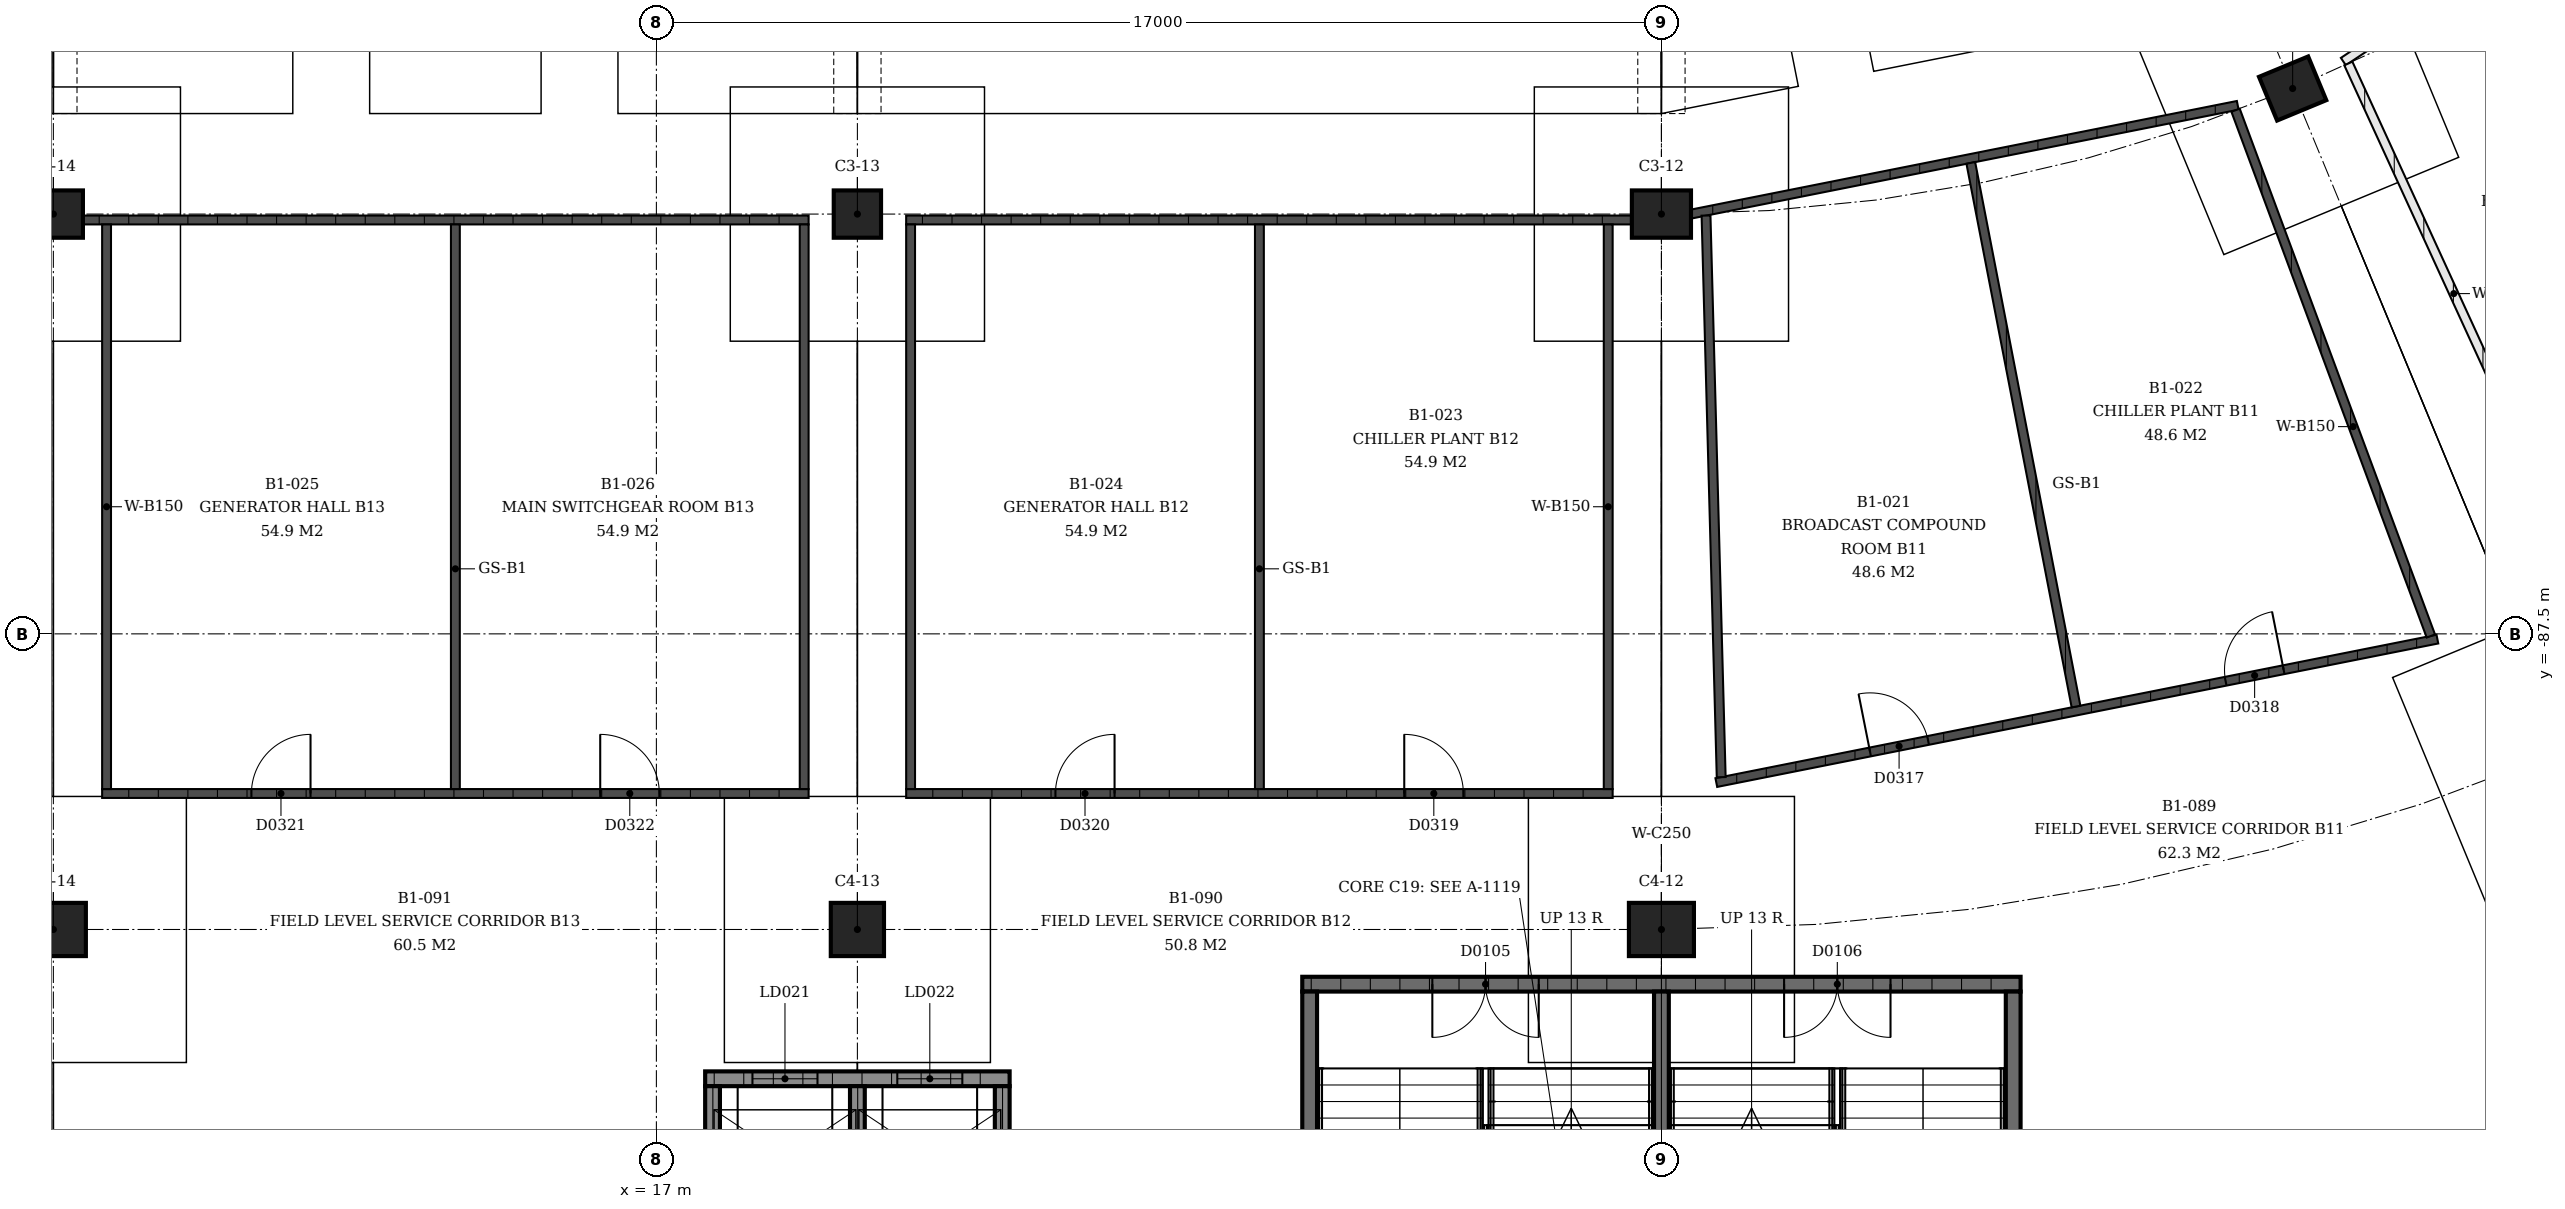
"""IFC4 building model, lengths in metres.
Left out: names, types, materials, properties, quantities, classifications, styles, units other than length and angle.
Written with IfcOpenShell. Run it as: python <this file> out.ifc"""

import sys

from ifc_helpers import new_model, si_unit, direction, frame, frame_2d, origin, origin_2d, place, context, subcontext, project, spatial, rectangle, extrude, element, fill, save


model = new_model("IFC4")
c1 = context("Model", 3, precision=1e-05, world=origin(), true_north=direction((0.0, 1.0)))
c2 = subcontext(c1, "Body", "Model", "MODEL_VIEW")
j1 = project(units=[si_unit("LENGTHUNIT", "METRE"), si_unit("PLANEANGLEUNIT", "RADIAN")], contexts=[c1])
p1 = place(None, origin())
s1 = spatial("IfcSite", under=j1, at=p1, CompositionType="ELEMENT")
p2 = place(p1, origin())
s2 = spatial("IfcBuilding", under=s1, at=p2, CompositionType="ELEMENT")
p3 = place(p2, frame((0.0, 0.0, -4.5)))
s3 = spatial("IfcBuildingStorey", under=s2, at=p3, CompositionType="ELEMENT", Elevation=-4.5)
p4 = place(p3, frame((44.677, -78.276, 0.0), z_axis=(0.0, 0.0, 1.0), x_axis=(0.923879532511, 0.382683432365, 0.0)))
e1 = element("IfcColumn", 1, at=p4, inside=s3, PredefinedType="COLUMN", context=c2, shape_type="SweptSolid", body=[
    extrude(rectangle(XDim=0.9, YDim=0.8, at=origin_2d()), origin(), (0.0, 0.0, 1.0), 4.5),
])
p5 = place(p3, frame((34.0, -80.4, 0.0), z_axis=(0.0, 0.0, 1.0), x_axis=(1.0, 0.0, 0.0)))
e2 = element("IfcColumn", 2, at=p5, inside=s3, PredefinedType="COLUMN", context=c2, shape_type="SweptSolid", body=[
    extrude(rectangle(XDim=1.0, YDim=0.8, at=origin_2d()), origin(), (0.0, 0.0, 1.0), 4.5),
])
p6 = place(p3, frame((34.0, -92.5, 0.0), z_axis=(0.0, 0.0, 1.0), x_axis=(1.0, 0.0, 0.0)))
e3 = element("IfcColumn", 3, at=p6, inside=s3, PredefinedType="COLUMN", context=c2, shape_type="SweptSolid", body=[
    extrude(rectangle(XDim=1.1, YDim=0.9, at=origin_2d()), origin(), (0.0, 0.0, 1.0), 4.5),
])
p7 = place(p3, frame((20.4, -80.4, 0.0), z_axis=(0.0, 0.0, 1.0), x_axis=(1.0, 0.0, 0.0)))
e4 = element("IfcColumn", 4, at=p7, inside=s3, PredefinedType="COLUMN", context=c2, shape_type="SweptSolid", body=[
    extrude(rectangle(XDim=0.8, YDim=0.8, at=origin_2d()), origin(), (0.0, 0.0, 1.0), 4.5),
])
p8 = place(p3, frame((20.4, -92.5, 0.0), z_axis=(0.0, 0.0, 1.0), x_axis=(1.0, 0.0, 0.0)))
e5 = element("IfcColumn", 5, at=p8, inside=s3, PredefinedType="COLUMN", context=c2, shape_type="SweptSolid", body=[
    extrude(rectangle(XDim=0.9, YDim=0.9, at=origin_2d()), origin(), (0.0, 0.0, 1.0), 4.5),
])
p9 = place(p3, frame((6.8, -80.4, 0.0), z_axis=(0.0, 0.0, 1.0), x_axis=(1.0, 0.0, 0.0)))
e6 = element("IfcColumn", 6, at=p9, inside=s3, PredefinedType="COLUMN", context=c2, shape_type="SweptSolid", body=[
    extrude(rectangle(XDim=1.0, YDim=0.8, at=origin_2d()), origin(), (0.0, 0.0, 1.0), 4.5),
])
p10 = place(p3, frame((6.8, -92.5, 0.0), z_axis=(0.0, 0.0, 1.0), x_axis=(1.0, 0.0, 0.0)))
e7 = element("IfcColumn", 7, at=p10, inside=s3, PredefinedType="COLUMN", context=c2, shape_type="SweptSolid", body=[
    extrude(rectangle(XDim=1.1, YDim=0.9, at=origin_2d()), origin(), (0.0, 0.0, 1.0), 4.5),
])
p11 = place(p3, frame((27.925, -93.425, 0.0), z_axis=(0.0, 0.0, 1.0), x_axis=(1.0, 0.0, 0.0)))
e8 = element("IfcWall", 8, at=p11, inside=s3, PredefinedType="SHEAR", context=c2, shape_type="SweptSolid", body=[
    extrude(rectangle(XDim=12.15, YDim=0.25, at=frame_2d((6.075, 0.0))), origin(), (0.0, 0.0, 1.0), 4.09),
])
p12 = place(p11, frame((2.2, 0.0, 0.0)))
e9 = element("IfcOpeningElement", 9, at=p12, cuts=e8, PredefinedType="OPENING", context=c2, shape_type="SweptSolid", body=[
    extrude(rectangle(XDim=1.8, YDim=2.1, at=frame_2d((0.9, 1.05))), frame((0.0, 0.125, 0.0), z_axis=(0.0, -1.0, 0.0), x_axis=(1.0, 0.0, 0.0)), (0.0, 0.0, 1.0), 0.25),
])
p13 = place(p11, frame((8.15, 0.0, 0.0)))
e10 = element("IfcOpeningElement", 10, at=p13, cuts=e8, PredefinedType="OPENING", context=c2, shape_type="SweptSolid", body=[
    extrude(rectangle(XDim=1.8, YDim=2.1, at=frame_2d((0.9, 1.05))), frame((0.0, 0.125, 0.0), z_axis=(0.0, -1.0, 0.0), x_axis=(1.0, 0.0, 0.0)), (0.0, 0.0, 1.0), 0.25),
])
p14 = place(p3, frame((28.05, -93.55, 0.0), z_axis=(0.0, 0.0, 1.0), x_axis=(0.0, -1.0, 0.0)))
e11 = element("IfcWall", 11, at=p14, inside=s3, PredefinedType="SHEAR", context=c2, shape_type="SweptSolid", body=[
    extrude(rectangle(XDim=7.46, YDim=0.25, at=frame_2d((3.73, 0.0))), origin(), (0.0, 0.0, 1.0), 4.09),
])
p15 = place(p3, frame((39.95, -93.55, 0.0), z_axis=(0.0, 0.0, 1.0), x_axis=(0.0, -1.0, 0.0)))
e12 = element("IfcWall", 12, at=p15, inside=s3, PredefinedType="SHEAR", context=c2, shape_type="SweptSolid", body=[
    extrude(rectangle(XDim=7.71, YDim=0.25, at=frame_2d((3.855, 0.0))), origin(), (0.0, 0.0, 1.0), 4.09),
])
p16 = place(p3, frame((34.0, -93.55, 0.0), z_axis=(0.0, 0.0, 1.0), x_axis=(0.0, -1.0, 0.0)))
e13 = element("IfcWall", 13, at=p16, inside=s3, PredefinedType="SHEAR", context=c2, shape_type="SweptSolid", body=[
    extrude(rectangle(XDim=7.46, YDim=0.25, at=frame_2d((3.73, 0.0))), origin(), (0.0, 0.0, 1.0), 4.09),
])
p17 = place(p3, frame((17.825, -95.025, -1.2), z_axis=(0.0, 0.0, 1.0), x_axis=(1.0, 0.0, 0.0)))
e14 = element("IfcWall", 14, at=p17, inside=s3, PredefinedType="SHEAR", context=c2, shape_type="SweptSolid", body=[
    extrude(rectangle(XDim=5.15, YDim=0.25, at=frame_2d((2.575, 0.0))), origin(), (0.0, 0.0, 1.0), 5.29),
])
p18 = place(p17, frame((0.8, 0.0, 1.2)))
e15 = element("IfcOpeningElement", 15, at=p18, cuts=e14, PredefinedType="OPENING", context=c2, shape_type="SweptSolid", body=[
    extrude(rectangle(XDim=1.1, YDim=2.1, at=frame_2d((0.55, 1.05))), frame((0.0, 0.125, 0.0), z_axis=(0.0, -1.0, 0.0), x_axis=(1.0, 0.0, 0.0)), (0.0, 0.0, 1.0), 0.25),
])
p19 = place(p17, frame((3.25, 0.0, 1.2)))
e16 = element("IfcOpeningElement", 16, at=p19, cuts=e14, PredefinedType="OPENING", context=c2, shape_type="SweptSolid", body=[
    extrude(rectangle(XDim=1.1, YDim=2.1, at=frame_2d((0.55, 1.05))), frame((0.0, 0.125, 0.0), z_axis=(0.0, -1.0, 0.0), x_axis=(1.0, 0.0, 0.0)), (0.0, 0.0, 1.0), 0.25),
])
for number, where, z_axis, x_axis in (
    (17, (17.95, -95.15, -1.2), (0.0, 0.0, 1.0), (0.0, -1.0, 0.0)),
    (18, (22.85, -95.15, -1.2), (0.0, 0.0, 1.0), (0.0, -1.0, 0.0)),
    (19, (20.4, -95.15, -1.2), (0.0, 0.0, 1.0), (0.0, -1.0, 0.0)),
):
    element("IfcWall", number, at=place(p3, frame(where, z_axis=z_axis, x_axis=x_axis)), inside=s3, PredefinedType="SHEAR", context=c2, shape_type="SweptSolid", body=[
        extrude(rectangle(XDim=3.0, YDim=0.25, at=frame_2d((1.5, 0.0))), origin(), (0.0, 0.0, 1.0), 5.29),
    ])
p20 = place(p3, frame((53.417, -72.554, 0.0), z_axis=(0.0, 0.0, 1.0), x_axis=(-0.831475366226, -0.555561621569, 0.0)))
e20 = element("IfcWall", 20, at=p20, inside=s3, PredefinedType="PARTITIONING", context=c2, shape_type="SweptSolid", body=[
    extrude(rectangle(XDim=9.48, YDim=0.15, at=frame_2d((4.74, 0.0))), origin(), (0.0, 0.0, 1.0), 3.0),
])
p21 = place(p3, frame((45.619, -77.853, 0.0), z_axis=(0.0, 0.0, 1.0), x_axis=(0.416598882755, -0.909090408533, 0.0)))
e21 = element("IfcWall", 21, at=p21, inside=s3, PredefinedType="PARTITIONING", context=c2, shape_type="SweptSolid", body=[
    extrude(rectangle(XDim=9.487, YDim=0.15, at=frame_2d((4.743, 0.0))), origin(), (0.0, 0.0, 1.0), 3.0),
])
p22 = place(p3, frame((34.5, -80.401, 0.0), z_axis=(0.0, 0.0, 1.0), x_axis=(0.980785277375, 0.195090337241, 0.0)))
e22 = element("IfcWall", 22, at=p22, inside=s3, PredefinedType="SOLIDWALL", context=c2, shape_type="SweptSolid", body=[
    extrude(rectangle(XDim=9.429, YDim=0.15, at=frame_2d((4.715, 0.0))), origin(), (0.0, 0.0, 1.0), 3.0),
])
p23 = place(p3, frame((34.929, -90.015, 0.0), z_axis=(0.0, 0.0, 1.0), x_axis=(0.980781768414, 0.19510797715, 0.0)))
e23 = element("IfcWall", 23, at=p23, inside=s3, PredefinedType="SOLIDWALL", context=c2, shape_type="SweptSolid", body=[
    extrude(rectangle(XDim=12.436, YDim=0.15, at=frame_2d((6.218, 0.0))), origin(), (0.0, 0.0, 1.0), 3.0),
])
p24 = place(p23, frame((2.652, 0.0, 0.0)))
e24 = element("IfcOpeningElement", 24, at=p24, cuts=e23, PredefinedType="OPENING", context=c2, shape_type="SweptSolid", body=[
    extrude(rectangle(XDim=1.0, YDim=2.1, at=frame_2d((0.5, 1.05))), frame((0.0, 0.075, 0.0), z_axis=(0.0, -1.0, 0.0), x_axis=(1.0, 0.0, 0.0)), (0.0, 0.0, 1.0), 0.15),
])
p25 = place(p23, frame((8.784, 0.0, 0.0)))
e25 = element("IfcOpeningElement", 25, at=p25, cuts=e23, PredefinedType="OPENING", context=c2, shape_type="SweptSolid", body=[
    extrude(rectangle(XDim=1.0, YDim=2.1, at=frame_2d((0.5, 1.05))), frame((0.0, 0.075, 0.0), z_axis=(0.0, -1.0, 0.0), x_axis=(1.0, 0.0, 0.0)), (0.0, 0.0, 1.0), 0.15),
])
p26 = place(p3, frame((34.754, -80.425, 0.0), z_axis=(0.0, 0.0, 1.0), x_axis=(0.027003283405, -0.999635344856, 0.0)))
e26 = element("IfcWall", 26, at=p26, inside=s3, PredefinedType="SOLIDWALL", context=c2, shape_type="SweptSolid", body=[
    extrude(rectangle(XDim=9.502, YDim=0.15, at=frame_2d((4.751, 0.0))), origin(), (0.0, 0.0, 1.0), 3.0),
])
p27 = place(p3, frame((39.233, -79.534, 0.0), z_axis=(0.0, 0.0, 1.0), x_axis=(0.190042167924, -0.98177592882, 0.0)))
e27 = element("IfcWall", 27, at=p27, inside=s3, PredefinedType="SOLIDWALL", context=c2, shape_type="SweptSolid", body=[
    extrude(rectangle(XDim=9.366, YDim=0.15, at=frame_2d((4.683, 0.0))), origin(), (0.0, 0.0, 1.0), 3.0),
])
p28 = place(p3, frame((43.711, -78.643, 0.0), z_axis=(0.0, 0.0, 1.0), x_axis=(0.348225298515, -0.937410871216, 0.0)))
e28 = element("IfcWall", 28, at=p28, inside=s3, PredefinedType="SOLIDWALL", context=c2, shape_type="SweptSolid", body=[
    extrude(rectangle(XDim=9.487, YDim=0.15, at=frame_2d((4.743, 0.0))), origin(), (0.0, 0.0, 1.0), 3.0),
])
p29 = place(p3, frame((33.5, -80.5, 0.0), z_axis=(0.0, 0.0, 1.0), x_axis=(-1.0, 0.0, 0.0)))
e29 = element("IfcWall", 29, at=p29, inside=s3, PredefinedType="SOLIDWALL", context=c2, shape_type="SweptSolid", body=[
    extrude(rectangle(XDim=12.275, YDim=0.15, at=frame_2d((6.137, 0.0))), origin(), (0.0, 0.0, 1.0), 3.0),
])
p30 = place(p3, frame((33.175, -90.2, 0.0), z_axis=(0.0, 0.0, 1.0), x_axis=(-1.0, 0.0, 0.0)))
e30 = element("IfcWall", 30, at=p30, inside=s3, PredefinedType="SOLIDWALL", context=c2, shape_type="SweptSolid", body=[
    extrude(rectangle(XDim=11.95, YDim=0.15, at=frame_2d((5.975, 0.0))), origin(), (0.0, 0.0, 1.0), 3.0),
])
p31 = place(p30, frame((2.525, 0.0, 0.0)))
e31 = element("IfcOpeningElement", 31, at=p31, cuts=e30, PredefinedType="OPENING", context=c2, shape_type="SweptSolid", body=[
    extrude(rectangle(XDim=1.0, YDim=2.1, at=frame_2d((0.5, 1.05))), frame((0.0, 0.075, 0.0), z_axis=(0.0, -1.0, 0.0), x_axis=(1.0, 0.0, 0.0)), (0.0, 0.0, 1.0), 0.15),
])
p32 = place(p30, frame((8.425, 0.0, 0.0)))
e32 = element("IfcOpeningElement", 32, at=p32, cuts=e30, PredefinedType="OPENING", context=c2, shape_type="SweptSolid", body=[
    extrude(rectangle(XDim=1.0, YDim=2.1, at=frame_2d((0.5, 1.05))), frame((0.0, 0.075, 0.0), z_axis=(0.0, -1.0, 0.0), x_axis=(1.0, 0.0, 0.0)), (0.0, 0.0, 1.0), 0.15),
])
for number, where, z_axis, x_axis in (
    (33, (33.1, -80.575, 0.0), (0.0, 0.0, 1.0), (0.0, -1.0, 0.0)),
    (34, (27.2, -80.575, 0.0), (0.0, 0.0, 1.0), (0.0, -1.0, 0.0)),
    (35, (21.3, -80.575, 0.0), (0.0, 0.0, 1.0), (0.0, -1.0, 0.0)),
):
    element("IfcWall", number, at=place(p3, frame(where, z_axis=z_axis, x_axis=x_axis)), inside=s3, PredefinedType="SOLIDWALL", context=c2, shape_type="SweptSolid", body=[
        extrude(rectangle(XDim=9.55, YDim=0.15, at=frame_2d((4.775, 0.0))), origin(), (0.0, 0.0, 1.0), 3.0),
    ])
p33 = place(p3, frame((7.3, -80.5, 0.0), z_axis=(0.0, 0.0, 1.0), x_axis=(1.0, 0.0, 0.0)))
e36 = element("IfcWall", 36, at=p33, inside=s3, PredefinedType="SOLIDWALL", context=c2, shape_type="SweptSolid", body=[
    extrude(rectangle(XDim=12.275, YDim=0.15, at=frame_2d((6.137, 0.0))), origin(), (0.0, 0.0, 1.0), 3.0),
])
p34 = place(p3, frame((7.625, -90.2, 0.0), z_axis=(0.0, 0.0, 1.0), x_axis=(1.0, 0.0, 0.0)))
e37 = element("IfcWall", 37, at=p34, inside=s3, PredefinedType="SOLIDWALL", context=c2, shape_type="SweptSolid", body=[
    extrude(rectangle(XDim=11.95, YDim=0.15, at=frame_2d((5.975, 0.0))), origin(), (0.0, 0.0, 1.0), 3.0),
])
p35 = place(p34, frame((2.525, 0.0, 0.0)))
e38 = element("IfcOpeningElement", 38, at=p35, cuts=e37, PredefinedType="OPENING", context=c2, shape_type="SweptSolid", body=[
    extrude(rectangle(XDim=1.0, YDim=2.1, at=frame_2d((0.5, 1.05))), frame((0.0, 0.075, 0.0), z_axis=(0.0, -1.0, 0.0), x_axis=(1.0, 0.0, 0.0)), (0.0, 0.0, 1.0), 0.15),
])
p36 = place(p34, frame((8.425, 0.0, 0.0)))
e39 = element("IfcOpeningElement", 39, at=p36, cuts=e37, PredefinedType="OPENING", context=c2, shape_type="SweptSolid", body=[
    extrude(rectangle(XDim=1.0, YDim=2.1, at=frame_2d((0.5, 1.05))), frame((0.0, 0.075, 0.0), z_axis=(0.0, -1.0, 0.0), x_axis=(1.0, 0.0, 0.0)), (0.0, 0.0, 1.0), 0.15),
])
for number, where, z_axis, x_axis in (
    (40, (7.7, -80.575, 0.0), (0.0, 0.0, 1.0), (0.0, -1.0, 0.0)),
    (41, (13.6, -80.575, 0.0), (0.0, 0.0, 1.0), (0.0, -1.0, 0.0)),
    (42, (19.5, -80.575, 0.0), (0.0, 0.0, 1.0), (0.0, -1.0, 0.0)),
):
    element("IfcWall", number, at=place(p3, frame(where, z_axis=z_axis, x_axis=x_axis)), inside=s3, PredefinedType="SOLIDWALL", context=c2, shape_type="SweptSolid", body=[
        extrude(rectangle(XDim=9.55, YDim=0.15, at=frame_2d((4.775, 0.0))), origin(), (0.0, 0.0, 1.0), 3.0),
    ])
p37 = place(p12, origin())
e43 = element("IfcDoor", 43, at=p37, inside=s3, OperationType="DOUBLE_DOOR_SINGLE_SWING", PredefinedType="DOOR", context=c2, shape_type="SweptSolid", body=[
    extrude(rectangle(XDim=1.8, YDim=2.1, at=frame_2d((0.9, 1.05))), frame((0.0, 0.025, 0.0), z_axis=(0.0, -1.0, 0.0), x_axis=(1.0, 0.0, 0.0)), (0.0, 0.0, 1.0), 0.05),
])
fill(e9, e43)
p38 = place(p13, origin())
e44 = element("IfcDoor", 44, at=p38, inside=s3, OperationType="DOUBLE_DOOR_SINGLE_SWING", PredefinedType="DOOR", context=c2, shape_type="SweptSolid", body=[
    extrude(rectangle(XDim=1.8, YDim=2.1, at=frame_2d((0.9, 1.05))), frame((0.0, 0.025, 0.0), z_axis=(0.0, -1.0, 0.0), x_axis=(1.0, 0.0, 0.0)), (0.0, 0.0, 1.0), 0.05),
])
fill(e10, e44)
p39 = place(p18, origin())
e45 = element("IfcDoor", 45, at=p39, inside=s3, OperationType="SLIDING_TO_LEFT", PredefinedType="DOOR", context=c2, shape_type="SweptSolid", body=[
    extrude(rectangle(XDim=1.1, YDim=2.1, at=frame_2d((0.55, 1.05))), frame((0.0, 0.025, 0.0), z_axis=(0.0, -1.0, 0.0), x_axis=(1.0, 0.0, 0.0)), (0.0, 0.0, 1.0), 0.05),
])
fill(e15, e45)
p40 = place(p19, origin())
e46 = element("IfcDoor", 46, at=p40, inside=s3, OperationType="SLIDING_TO_LEFT", PredefinedType="DOOR", context=c2, shape_type="SweptSolid", body=[
    extrude(rectangle(XDim=1.1, YDim=2.1, at=frame_2d((0.55, 1.05))), frame((0.0, 0.025, 0.0), z_axis=(0.0, -1.0, 0.0), x_axis=(1.0, 0.0, 0.0)), (0.0, 0.0, 1.0), 0.05),
])
fill(e16, e46)
p41 = place(p24, origin())
e47 = element("IfcDoor", 47, at=p41, inside=s3, OperationType="SINGLE_SWING_RIGHT", PredefinedType="DOOR", context=c2, shape_type="SweptSolid", body=[
    extrude(rectangle(XDim=1.0, YDim=2.1, at=frame_2d((0.5, 1.05))), frame((0.0, 0.025, 0.0), z_axis=(0.0, -1.0, 0.0), x_axis=(1.0, 0.0, 0.0)), (0.0, 0.0, 1.0), 0.05),
])
fill(e24, e47)
p42 = place(p25, origin())
e48 = element("IfcDoor", 48, at=p42, inside=s3, OperationType="SINGLE_SWING_LEFT", PredefinedType="DOOR", context=c2, shape_type="SweptSolid", body=[
    extrude(rectangle(XDim=1.0, YDim=2.1, at=frame_2d((0.5, 1.05))), frame((0.0, 0.025, 0.0), z_axis=(0.0, -1.0, 0.0), x_axis=(1.0, 0.0, 0.0)), (0.0, 0.0, 1.0), 0.05),
])
fill(e25, e48)
p43 = place(p31, origin())
e49 = element("IfcDoor", 49, at=p43, inside=s3, OperationType="SINGLE_SWING_RIGHT", PredefinedType="DOOR", context=c2, shape_type="SweptSolid", body=[
    extrude(rectangle(XDim=1.0, YDim=2.1, at=frame_2d((0.5, 1.05))), frame((0.0, 0.025, 0.0), z_axis=(0.0, -1.0, 0.0), x_axis=(1.0, 0.0, 0.0)), (0.0, 0.0, 1.0), 0.05),
])
fill(e31, e49)
p44 = place(p32, origin())
e50 = element("IfcDoor", 50, at=p44, inside=s3, OperationType="SINGLE_SWING_LEFT", PredefinedType="DOOR", context=c2, shape_type="SweptSolid", body=[
    extrude(rectangle(XDim=1.0, YDim=2.1, at=frame_2d((0.5, 1.05))), frame((0.0, 0.025, 0.0), z_axis=(0.0, -1.0, 0.0), x_axis=(1.0, 0.0, 0.0)), (0.0, 0.0, 1.0), 0.05),
])
fill(e32, e50)
p45 = place(p35, origin())
e51 = element("IfcDoor", 51, at=p45, inside=s3, OperationType="SINGLE_SWING_LEFT", PredefinedType="DOOR", context=c2, shape_type="SweptSolid", body=[
    extrude(rectangle(XDim=1.0, YDim=2.1, at=frame_2d((0.5, 1.05))), frame((0.0, 0.025, 0.0), z_axis=(0.0, -1.0, 0.0), x_axis=(1.0, 0.0, 0.0)), (0.0, 0.0, 1.0), 0.05),
])
fill(e38, e51)
p46 = place(p36, origin())
e52 = element("IfcDoor", 52, at=p46, inside=s3, OperationType="SINGLE_SWING_RIGHT", PredefinedType="DOOR", context=c2, shape_type="SweptSolid", body=[
    extrude(rectangle(XDim=1.0, YDim=2.1, at=frame_2d((0.5, 1.05))), frame((0.0, 0.025, 0.0), z_axis=(0.0, -1.0, 0.0), x_axis=(1.0, 0.0, 0.0)), (0.0, 0.0, 1.0), 0.05),
])
fill(e39, e52)
save(model, sys.argv[1])
